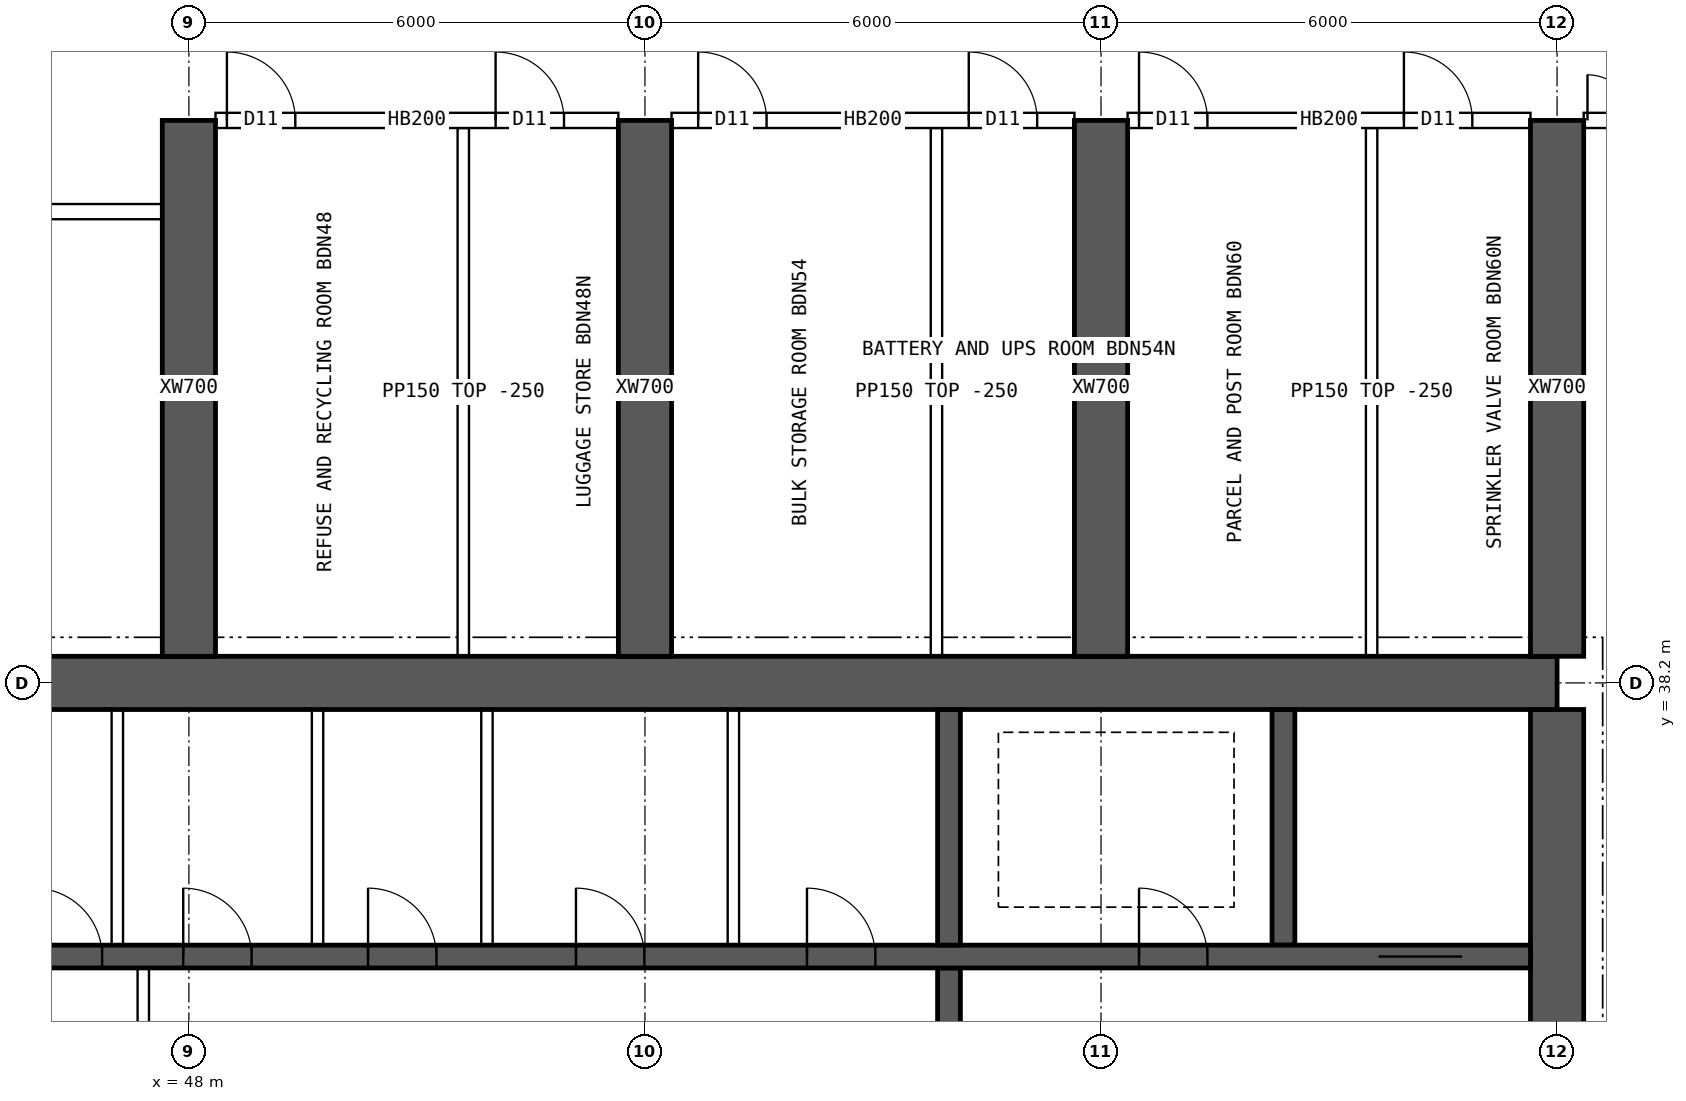
"""IFC4 building model, lengths in metres.
Left out: names, types, materials, properties, quantities, classifications, styles, units other than length and angle.
Written with IfcOpenShell. Run it as: python <this file> out.ifc"""

import sys

from ifc_helpers import new_model, si_unit, direction, frame, frame_2d, origin, place, context, subcontext, project, spatial, rectangle, extrude, element, fill, save


model = new_model("IFC4")
c1 = context("Model", 3, precision=1e-05, world=origin(), true_north=direction((0.0, 1.0)))
c2 = subcontext(c1, "Body", "Model", "MODEL_VIEW")
j1 = project(units=[si_unit("LENGTHUNIT", "METRE"), si_unit("PLANEANGLEUNIT", "RADIAN")], contexts=[c1])
p1 = place(None, origin())
s1 = spatial("IfcSite", under=j1, at=p1, CompositionType="ELEMENT")
p2 = place(p1, origin())
s2 = spatial("IfcBuilding", under=s1, at=p2, CompositionType="ELEMENT")
p3 = place(p2, frame((0.0, 0.0, 220.3)))
s3 = spatial("IfcBuildingStorey", under=s2, at=p3, CompositionType="ELEMENT", Elevation=220.3)
p4 = place(p3, frame((18.0, 38.2, 0.0), z_axis=(0.0, 0.0, 1.0), x_axis=(1.0, 0.0, 0.0)))
e1 = element("IfcWall", 1, at=p4, inside=s3, PredefinedType="SHEAR", context=c2, shape_type="SweptSolid", body=[
    extrude(rectangle(XDim=48.0, YDim=0.7, at=frame_2d((24.0, 0.0))), origin(), (0.0, 0.0, 1.0), 3.75),
])
p5 = place(p3, frame((66.0, 26.15, 0.0), z_axis=(0.0, 0.0, 1.0), x_axis=(0.0, 1.0, 0.0)))
e2 = element("IfcWall", 2, at=p5, inside=s3, PredefinedType="SHEAR", context=c2, shape_type="SweptSolid", body=[
    extrude(rectangle(XDim=11.7, YDim=0.7, at=frame_2d((5.85, 0.0))), origin(), (0.0, 0.0, 1.0), 3.75),
])
p6 = place(p5, frame((5.15, 0.0, 0.0)))
e3 = element("IfcOpeningElement", 3, at=p6, cuts=e2, PredefinedType="OPENING", context=c2, shape_type="SweptSolid", body=[
    extrude(rectangle(XDim=1.2, YDim=2.1, at=frame_2d((0.6, 1.05))), frame((0.0, 0.36, 0.0), z_axis=(0.0, -1.0, 0.0), x_axis=(1.0, 0.0, 0.0)), (0.0, 0.0, 1.0), 0.72),
])
p7 = place(p3, frame((18.35, 34.6, 0.0), z_axis=(0.0, 0.0, 1.0), x_axis=(1.0, 0.0, 0.0)))
e4 = element("IfcWall", 4, at=p7, inside=s3, PredefinedType="SHEAR", context=c2, shape_type="SweptSolid", body=[
    extrude(rectangle(XDim=47.3, YDim=0.3, at=frame_2d((23.65, 0.0))), origin(), (0.0, 0.0, 1.0), 3.75),
])
p8 = place(p7, frame((0.9, 0.0, 0.0)))
e5 = element("IfcOpeningElement", 5, at=p8, cuts=e4, PredefinedType="OPENING", context=c2, shape_type="SweptSolid", body=[
    extrude(rectangle(XDim=1.1, YDim=2.1, at=frame_2d((0.55, 1.05))), frame((0.0, 0.16, 0.0), z_axis=(0.0, -1.0, 0.0), x_axis=(1.0, 0.0, 0.0)), (0.0, 0.0, 1.0), 0.32),
])
p9 = place(p7, frame((45.3, 0.0, 0.0)))
e6 = element("IfcOpeningElement", 6, at=p9, cuts=e4, PredefinedType="OPENING", context=c2, shape_type="SweptSolid", body=[
    extrude(rectangle(XDim=1.1, YDim=2.1, at=frame_2d((0.55, 1.05))), frame((0.0, 0.16, 0.0), z_axis=(0.0, -1.0, 0.0), x_axis=(1.0, 0.0, 0.0)), (0.0, 0.0, 1.0), 0.32),
])
p10 = place(p7, frame((4.25, 0.0, 0.0)))
e7 = element("IfcOpeningElement", 7, at=p10, cuts=e4, PredefinedType="OPENING", context=c2, shape_type="SweptSolid", body=[
    extrude(rectangle(XDim=0.9, YDim=2.1, at=frame_2d((0.45, 1.05))), frame((0.0, 0.16, 0.0), z_axis=(0.0, -1.0, 0.0), x_axis=(1.0, 0.0, 0.0)), (0.0, 0.0, 1.0), 0.32),
])
p11 = place(p7, frame((42.15, 0.0, 0.0)))
e8 = element("IfcOpeningElement", 8, at=p11, cuts=e4, PredefinedType="OPENING", context=c2, shape_type="SweptSolid", body=[
    extrude(rectangle(XDim=0.9, YDim=2.1, at=frame_2d((0.45, 1.05))), frame((0.0, 0.16, 0.0), z_axis=(0.0, -1.0, 0.0), x_axis=(1.0, 0.0, 0.0)), (0.0, 0.0, 1.0), 0.32),
])
p12 = place(p7, frame((9.025, 0.0, 0.0)))
e9 = element("IfcOpeningElement", 9, at=p12, cuts=e4, PredefinedType="OPENING", context=c2, shape_type="SweptSolid", body=[
    extrude(rectangle(XDim=0.9, YDim=2.1, at=frame_2d((0.45, 1.05))), frame((0.0, 0.16, 0.0), z_axis=(0.0, -1.0, 0.0), x_axis=(1.0, 0.0, 0.0)), (0.0, 0.0, 1.0), 0.32),
])
p13 = place(p7, frame((12.999, 0.0, 0.0)))
e10 = element("IfcOpeningElement", 10, at=p13, cuts=e4, PredefinedType="OPENING", context=c2, shape_type="SweptSolid", body=[
    extrude(rectangle(XDim=0.9, YDim=2.1, at=frame_2d((0.45, 1.05))), frame((0.0, 0.16, 0.0), z_axis=(0.0, -1.0, 0.0), x_axis=(1.0, 0.0, 0.0)), (0.0, 0.0, 1.0), 0.32),
])
p14 = place(p7, frame((16.646, 0.0, 0.0)))
e11 = element("IfcOpeningElement", 11, at=p14, cuts=e4, PredefinedType="OPENING", context=c2, shape_type="SweptSolid", body=[
    extrude(rectangle(XDim=0.9, YDim=2.1, at=frame_2d((0.45, 1.05))), frame((0.0, 0.16, 0.0), z_axis=(0.0, -1.0, 0.0), x_axis=(1.0, 0.0, 0.0)), (0.0, 0.0, 1.0), 0.32),
])
p15 = place(p7, frame((20.405, 0.0, 0.0)))
e12 = element("IfcOpeningElement", 12, at=p15, cuts=e4, PredefinedType="OPENING", context=c2, shape_type="SweptSolid", body=[
    extrude(rectangle(XDim=0.9, YDim=2.1, at=frame_2d((0.45, 1.05))), frame((0.0, 0.16, 0.0), z_axis=(0.0, -1.0, 0.0), x_axis=(1.0, 0.0, 0.0)), (0.0, 0.0, 1.0), 0.32),
])
p16 = place(p7, frame((24.811, 0.0, 0.0)))
e13 = element("IfcOpeningElement", 13, at=p16, cuts=e4, PredefinedType="OPENING", context=c2, shape_type="SweptSolid", body=[
    extrude(rectangle(XDim=0.9, YDim=2.1, at=frame_2d((0.45, 1.05))), frame((0.0, 0.16, 0.0), z_axis=(0.0, -1.0, 0.0), x_axis=(1.0, 0.0, 0.0)), (0.0, 0.0, 1.0), 0.32),
])
p17 = place(p7, frame((27.608, 0.0, 0.0)))
e14 = element("IfcOpeningElement", 14, at=p17, cuts=e4, PredefinedType="OPENING", context=c2, shape_type="SweptSolid", body=[
    extrude(rectangle(XDim=0.9, YDim=2.1, at=frame_2d((0.45, 1.05))), frame((0.0, 0.16, 0.0), z_axis=(0.0, -1.0, 0.0), x_axis=(1.0, 0.0, 0.0)), (0.0, 0.0, 1.0), 0.32),
])
p18 = place(p7, frame((29.575, 0.0, 0.0)))
e15 = element("IfcOpeningElement", 15, at=p18, cuts=e4, PredefinedType="OPENING", context=c2, shape_type="SweptSolid", body=[
    extrude(rectangle(XDim=0.9, YDim=2.1, at=frame_2d((0.45, 1.05))), frame((0.0, 0.16, 0.0), z_axis=(0.0, -1.0, 0.0), x_axis=(1.0, 0.0, 0.0)), (0.0, 0.0, 1.0), 0.32),
])
p19 = place(p7, frame((32.007, 0.0, 0.0)))
e16 = element("IfcOpeningElement", 16, at=p19, cuts=e4, PredefinedType="OPENING", context=c2, shape_type="SweptSolid", body=[
    extrude(rectangle(XDim=0.9, YDim=2.1, at=frame_2d((0.45, 1.05))), frame((0.0, 0.16, 0.0), z_axis=(0.0, -1.0, 0.0), x_axis=(1.0, 0.0, 0.0)), (0.0, 0.0, 1.0), 0.32),
])
p20 = place(p7, frame((34.742, 0.0, 0.0)))
e17 = element("IfcOpeningElement", 17, at=p20, cuts=e4, PredefinedType="OPENING", context=c2, shape_type="SweptSolid", body=[
    extrude(rectangle(XDim=0.9, YDim=2.1, at=frame_2d((0.45, 1.05))), frame((0.0, 0.16, 0.0), z_axis=(0.0, -1.0, 0.0), x_axis=(1.0, 0.0, 0.0)), (0.0, 0.0, 1.0), 0.32),
])
p21 = place(p7, frame((37.781, 0.0, 0.0)))
e18 = element("IfcOpeningElement", 18, at=p21, cuts=e4, PredefinedType="OPENING", context=c2, shape_type="SweptSolid", body=[
    extrude(rectangle(XDim=0.9, YDim=2.1, at=frame_2d((0.45, 1.05))), frame((0.0, 0.16, 0.0), z_axis=(0.0, -1.0, 0.0), x_axis=(1.0, 0.0, 0.0)), (0.0, 0.0, 1.0), 0.32),
])
p22 = place(p3, frame((58.0, 30.55, 0.0), z_axis=(0.0, 0.0, 1.0), x_axis=(0.0, 1.0, 0.0)))
e19 = element("IfcWall", 19, at=p22, inside=s3, PredefinedType="SHEAR", context=c2, shape_type="SweptSolid", body=[
    extrude(rectangle(XDim=3.9, YDim=0.3, at=frame_2d((1.95, 0.0))), origin(), (0.0, 0.0, 1.0), 3.75),
])
p23 = place(p22, frame((1.4, 0.0, 0.0)))
e20 = element("IfcOpeningElement", 20, at=p23, cuts=e19, PredefinedType="OPENING", context=c2, shape_type="SweptSolid", body=[
    extrude(rectangle(XDim=1.2, YDim=2.1, at=frame_2d((0.6, 1.05))), frame((0.0, 0.16, 0.0), z_axis=(0.0, -1.0, 0.0), x_axis=(1.0, 0.0, 0.0)), (0.0, 0.0, 1.0), 0.32),
])
for number, where, z_axis, x_axis in (
    (21, (62.4, 34.75, 0.0), (0.0, 0.0, 1.0), (0.0, 1.0, 0.0)),
    (22, (58.0, 34.75, 0.0), (0.0, 0.0, 1.0), (0.0, 1.0, 0.0)),
):
    element("IfcWall", number, at=place(p3, frame(where, z_axis=z_axis, x_axis=x_axis)), inside=s3, PredefinedType="SHEAR", context=c2, shape_type="SweptSolid", body=[
        extrude(rectangle(XDim=3.1, YDim=0.3, at=frame_2d((1.55, 0.0))), origin(), (0.0, 0.0, 1.0), 3.75),
    ])
for number, where, z_axis, x_axis in (
    (23, (48.0, 38.55, 0.0), (0.0, 0.0, 1.0), (0.0, 1.0, 0.0)),
    (24, (54.0, 38.55, 0.0), (0.0, 0.0, 1.0), (0.0, 1.0, 0.0)),
    (25, (60.0, 38.55, 0.0), (0.0, 0.0, 1.0), (0.0, 1.0, 0.0)),
    (26, (66.0, 38.55, 0.0), (0.0, 0.0, 1.0), (0.0, 1.0, 0.0)),
):
    element("IfcWall", number, at=place(p3, frame(where, z_axis=z_axis, x_axis=x_axis)), inside=s3, PredefinedType="SHEAR", context=c2, shape_type="SweptSolid", body=[
        extrude(rectangle(XDim=7.05, YDim=0.7, at=frame_2d((3.525, 0.0))), origin(), (0.0, 0.0, 1.0), 3.75),
    ])
p24 = place(p3, frame((47.4, 30.55, 0.0), z_axis=(0.0, 0.0, 1.0), x_axis=(0.0, 1.0, 0.0)))
e27 = element("IfcWall", 27, at=p24, inside=s3, PredefinedType="SOLIDWALL", context=c2, shape_type="SweptSolid", body=[
    extrude(rectangle(XDim=3.9, YDim=0.15, at=frame_2d((1.95, 0.0))), origin(), (0.0, 0.0, 1.0), 3.5),
])
p25 = place(p24, frame((1.15, 0.0, 0.0)))
e28 = element("IfcOpeningElement", 28, at=p25, cuts=e27, PredefinedType="OPENING", context=c2, shape_type="SweptSolid", body=[
    extrude(rectangle(XDim=1.6, YDim=2.1, at=frame_2d((0.8, 1.05))), frame((0.0, 0.085, 0.0), z_axis=(0.0, -1.0, 0.0), x_axis=(1.0, 0.0, 0.0)), (0.0, 0.0, 1.0), 0.17),
])
for number, where, z_axis, x_axis in (
    (29, (47.058, 34.75, 0.0), (0.0, 0.0, 1.0), (0.0, 1.0, 0.0)),
    (30, (49.692, 34.75, 0.0), (0.0, 0.0, 1.0), (0.0, 1.0, 0.0)),
    (31, (51.921, 34.75, 0.0), (0.0, 0.0, 1.0), (0.0, 1.0, 0.0)),
    (32, (55.163, 34.75, 0.0), (0.0, 0.0, 1.0), (0.0, 1.0, 0.0)),
):
    element("IfcWall", number, at=place(p3, frame(where, z_axis=z_axis, x_axis=x_axis)), inside=s3, PredefinedType="SOLIDWALL", context=c2, shape_type="SweptSolid", body=[
        extrude(rectangle(XDim=3.1, YDim=0.15, at=frame_2d((1.55, 0.0))), origin(), (0.0, 0.0, 1.0), 3.5),
    ])
p26 = place(p3, frame((48.35, 45.6, 0.0), z_axis=(0.0, 0.0, 1.0), x_axis=(1.0, 0.0, 0.0)))
e33 = element("IfcWall", 33, at=p26, inside=s3, PredefinedType="SOLIDWALL", context=c2, shape_type="SweptSolid", body=[
    extrude(rectangle(XDim=5.3, YDim=0.2, at=frame_2d((2.65, 0.0))), origin(), (0.0, 0.0, 1.0), 3.5),
])
p27 = place(p26, frame((0.15, 0.0, 0.0)))
e34 = element("IfcOpeningElement", 34, at=p27, cuts=e33, PredefinedType="OPENING", context=c2, shape_type="SweptSolid", body=[
    extrude(rectangle(XDim=0.9, YDim=2.1, at=frame_2d((0.45, 1.05))), frame((0.0, 0.11, 0.0), z_axis=(0.0, -1.0, 0.0), x_axis=(1.0, 0.0, 0.0)), (0.0, 0.0, 1.0), 0.22),
])
p28 = place(p26, frame((3.685, 0.0, 0.0)))
e35 = element("IfcOpeningElement", 35, at=p28, cuts=e33, PredefinedType="OPENING", context=c2, shape_type="SweptSolid", body=[
    extrude(rectangle(XDim=0.9, YDim=2.1, at=frame_2d((0.45, 1.05))), frame((0.0, 0.11, 0.0), z_axis=(0.0, -1.0, 0.0), x_axis=(1.0, 0.0, 0.0)), (0.0, 0.0, 1.0), 0.22),
])
p29 = place(p3, frame((54.35, 45.6, 0.0), z_axis=(0.0, 0.0, 1.0), x_axis=(1.0, 0.0, 0.0)))
e36 = element("IfcWall", 36, at=p29, inside=s3, PredefinedType="SOLIDWALL", context=c2, shape_type="SweptSolid", body=[
    extrude(rectangle(XDim=5.3, YDim=0.2, at=frame_2d((2.65, 0.0))), origin(), (0.0, 0.0, 1.0), 3.5),
])
p30 = place(p29, frame((0.35, 0.0, 0.0)))
e37 = element("IfcOpeningElement", 37, at=p30, cuts=e36, PredefinedType="OPENING", context=c2, shape_type="SweptSolid", body=[
    extrude(rectangle(XDim=0.9, YDim=2.1, at=frame_2d((0.45, 1.05))), frame((0.0, 0.11, 0.0), z_axis=(0.0, -1.0, 0.0), x_axis=(1.0, 0.0, 0.0)), (0.0, 0.0, 1.0), 0.22),
])
p31 = place(p29, frame((3.91, 0.0, 0.0)))
e38 = element("IfcOpeningElement", 38, at=p31, cuts=e36, PredefinedType="OPENING", context=c2, shape_type="SweptSolid", body=[
    extrude(rectangle(XDim=0.9, YDim=2.1, at=frame_2d((0.45, 1.05))), frame((0.0, 0.11, 0.0), z_axis=(0.0, -1.0, 0.0), x_axis=(1.0, 0.0, 0.0)), (0.0, 0.0, 1.0), 0.22),
])
p32 = place(p3, frame((60.35, 45.6, 0.0), z_axis=(0.0, 0.0, 1.0), x_axis=(1.0, 0.0, 0.0)))
e39 = element("IfcWall", 39, at=p32, inside=s3, PredefinedType="SOLIDWALL", context=c2, shape_type="SweptSolid", body=[
    extrude(rectangle(XDim=5.3, YDim=0.2, at=frame_2d((2.65, 0.0))), origin(), (0.0, 0.0, 1.0), 3.5),
])
p33 = place(p32, frame((0.15, 0.0, 0.0)))
e40 = element("IfcOpeningElement", 40, at=p33, cuts=e39, PredefinedType="OPENING", context=c2, shape_type="SweptSolid", body=[
    extrude(rectangle(XDim=0.9, YDim=2.1, at=frame_2d((0.45, 1.05))), frame((0.0, 0.11, 0.0), z_axis=(0.0, -1.0, 0.0), x_axis=(1.0, 0.0, 0.0)), (0.0, 0.0, 1.0), 0.22),
])
p34 = place(p32, frame((3.635, 0.0, 0.0)))
e41 = element("IfcOpeningElement", 41, at=p34, cuts=e39, PredefinedType="OPENING", context=c2, shape_type="SweptSolid", body=[
    extrude(rectangle(XDim=0.9, YDim=2.1, at=frame_2d((0.45, 1.05))), frame((0.0, 0.11, 0.0), z_axis=(0.0, -1.0, 0.0), x_axis=(1.0, 0.0, 0.0)), (0.0, 0.0, 1.0), 0.22),
])
p35 = place(p3, frame((66.35, 45.6, 0.0), z_axis=(0.0, 0.0, 1.0), x_axis=(1.0, 0.0, 0.0)))
e42 = element("IfcWall", 42, at=p35, inside=s3, PredefinedType="SOLIDWALL", context=c2, shape_type="SweptSolid", body=[
    extrude(rectangle(XDim=2.05, YDim=0.2, at=frame_2d((1.025, 0.0))), origin(), (0.0, 0.0, 1.0), 3.5),
])
p36 = place(p35, frame((0.05, 0.0, 0.0)))
e43 = element("IfcOpeningElement", 43, at=p36, cuts=e42, PredefinedType="OPENING", context=c2, shape_type="SweptSolid", body=[
    extrude(rectangle(XDim=1.2, YDim=2.1, at=frame_2d((0.6, 1.05))), frame((0.0, 0.11, 0.0), z_axis=(0.0, -1.0, 0.0), x_axis=(1.0, 0.0, 0.0)), (0.0, 0.0, 1.0), 0.22),
])
p37 = place(p3, frame((42.35, 44.4, 0.0), z_axis=(0.0, 0.0, 1.0), x_axis=(1.0, 0.0, 0.0)))
e44 = element("IfcWall", 44, at=p37, inside=s3, PredefinedType="SOLIDWALL", context=c2, shape_type="SweptSolid", body=[
    extrude(rectangle(XDim=5.3, YDim=0.2, at=frame_2d((2.65, 0.0))), origin(), (0.0, 0.0, 1.0), 3.5),
])
p38 = place(p37, frame((0.8, 0.0, 0.0)))
e45 = element("IfcOpeningElement", 45, at=p38, cuts=e44, PredefinedType="OPENING", context=c2, shape_type="SweptSolid", body=[
    extrude(rectangle(XDim=1.0, YDim=2.1, at=frame_2d((0.5, 1.05))), frame((0.0, 0.11, 0.0), z_axis=(0.0, -1.0, 0.0), x_axis=(1.0, 0.0, 0.0)), (0.0, 0.0, 1.0), 0.22),
])
for number, where, z_axis, x_axis in (
    (46, (51.61, 38.55, 0.0), (0.0, 0.0, 1.0), (0.0, 1.0, 0.0)),
    (47, (57.835, 38.55, 0.0), (0.0, 0.0, 1.0), (0.0, 1.0, 0.0)),
    (48, (63.56, 38.55, 0.0), (0.0, 0.0, 1.0), (0.0, 1.0, 0.0)),
):
    element("IfcWall", number, at=place(p3, frame(where, z_axis=z_axis, x_axis=x_axis)), inside=s3, PredefinedType="PARTITIONING", context=c2, shape_type="SweptSolid", body=[
        extrude(rectangle(XDim=6.95, YDim=0.15, at=frame_2d((3.475, 0.0))), origin(), (0.0, 0.0, 1.0), 3.5),
    ])
p39 = place(p9, origin())
e49 = element("IfcDoor", 49, at=p39, inside=s3, OperationType="DOUBLE_DOOR_SLIDING", PredefinedType="DOOR", context=c2, shape_type="SweptSolid", body=[
    extrude(rectangle(XDim=1.1, YDim=2.1, at=frame_2d((0.55, 1.05))), frame((0.0, 0.025, 0.0), z_axis=(0.0, -1.0, 0.0), x_axis=(1.0, 0.0, 0.0)), (0.0, 0.0, 1.0), 0.05),
])
fill(e6, e49)
p40 = place(p11, origin())
e50 = element("IfcDoor", 50, at=p40, inside=s3, OperationType="SINGLE_SWING_LEFT", PredefinedType="DOOR", context=c2, shape_type="SweptSolid", body=[
    extrude(rectangle(XDim=0.9, YDim=2.1, at=frame_2d((0.45, 1.05))), frame((0.0, 0.025, 0.0), z_axis=(0.0, -1.0, 0.0), x_axis=(1.0, 0.0, 0.0)), (0.0, 0.0, 1.0), 0.05),
])
fill(e8, e50)
p41 = place(p17, origin())
e51 = element("IfcDoor", 51, at=p41, inside=s3, OperationType="SINGLE_SWING_LEFT", PredefinedType="DOOR", context=c2, shape_type="SweptSolid", body=[
    extrude(rectangle(XDim=0.9, YDim=2.1, at=frame_2d((0.45, 1.05))), frame((0.0, 0.025, 0.0), z_axis=(0.0, -1.0, 0.0), x_axis=(1.0, 0.0, 0.0)), (0.0, 0.0, 1.0), 0.05),
])
fill(e14, e51)
p42 = place(p18, origin())
e52 = element("IfcDoor", 52, at=p42, inside=s3, OperationType="SINGLE_SWING_LEFT", PredefinedType="DOOR", context=c2, shape_type="SweptSolid", body=[
    extrude(rectangle(XDim=0.9, YDim=2.1, at=frame_2d((0.45, 1.05))), frame((0.0, 0.025, 0.0), z_axis=(0.0, -1.0, 0.0), x_axis=(1.0, 0.0, 0.0)), (0.0, 0.0, 1.0), 0.05),
])
fill(e15, e52)
p43 = place(p19, origin())
e53 = element("IfcDoor", 53, at=p43, inside=s3, OperationType="SINGLE_SWING_LEFT", PredefinedType="DOOR", context=c2, shape_type="SweptSolid", body=[
    extrude(rectangle(XDim=0.9, YDim=2.1, at=frame_2d((0.45, 1.05))), frame((0.0, 0.025, 0.0), z_axis=(0.0, -1.0, 0.0), x_axis=(1.0, 0.0, 0.0)), (0.0, 0.0, 1.0), 0.05),
])
fill(e16, e53)
p44 = place(p20, origin())
e54 = element("IfcDoor", 54, at=p44, inside=s3, OperationType="SINGLE_SWING_LEFT", PredefinedType="DOOR", context=c2, shape_type="SweptSolid", body=[
    extrude(rectangle(XDim=0.9, YDim=2.1, at=frame_2d((0.45, 1.05))), frame((0.0, 0.025, 0.0), z_axis=(0.0, -1.0, 0.0), x_axis=(1.0, 0.0, 0.0)), (0.0, 0.0, 1.0), 0.05),
])
fill(e17, e54)
p45 = place(p21, origin())
e55 = element("IfcDoor", 55, at=p45, inside=s3, OperationType="SINGLE_SWING_LEFT", PredefinedType="DOOR", context=c2, shape_type="SweptSolid", body=[
    extrude(rectangle(XDim=0.9, YDim=2.1, at=frame_2d((0.45, 1.05))), frame((0.0, 0.025, 0.0), z_axis=(0.0, -1.0, 0.0), x_axis=(1.0, 0.0, 0.0)), (0.0, 0.0, 1.0), 0.05),
])
fill(e18, e55)
p46 = place(p36, origin())
e56 = element("IfcDoor", 56, at=p46, inside=s3, OperationType="DOUBLE_DOOR_SINGLE_SWING", PredefinedType="DOOR", context=c2, shape_type="SweptSolid", body=[
    extrude(rectangle(XDim=1.2, YDim=2.1, at=frame_2d((0.6, 1.05))), frame((0.0, 0.025, 0.0), z_axis=(0.0, -1.0, 0.0), x_axis=(1.0, 0.0, 0.0)), (0.0, 0.0, 1.0), 0.05),
])
fill(e43, e56)
p47 = place(p27, origin())
e57 = element("IfcDoor", 57, at=p47, inside=s3, OperationType="SINGLE_SWING_LEFT", PredefinedType="DOOR", context=c2, shape_type="SweptSolid", body=[
    extrude(rectangle(XDim=0.9, YDim=2.1, at=frame_2d((0.45, 1.05))), frame((0.0, 0.025, 0.0), z_axis=(0.0, -1.0, 0.0), x_axis=(1.0, 0.0, 0.0)), (0.0, 0.0, 1.0), 0.05),
])
fill(e34, e57)
p48 = place(p28, origin())
e58 = element("IfcDoor", 58, at=p48, inside=s3, OperationType="SINGLE_SWING_LEFT", PredefinedType="DOOR", context=c2, shape_type="SweptSolid", body=[
    extrude(rectangle(XDim=0.9, YDim=2.1, at=frame_2d((0.45, 1.05))), frame((0.0, 0.025, 0.0), z_axis=(0.0, -1.0, 0.0), x_axis=(1.0, 0.0, 0.0)), (0.0, 0.0, 1.0), 0.05),
])
fill(e35, e58)
p49 = place(p30, origin())
e59 = element("IfcDoor", 59, at=p49, inside=s3, OperationType="SINGLE_SWING_LEFT", PredefinedType="DOOR", context=c2, shape_type="SweptSolid", body=[
    extrude(rectangle(XDim=0.9, YDim=2.1, at=frame_2d((0.45, 1.05))), frame((0.0, 0.025, 0.0), z_axis=(0.0, -1.0, 0.0), x_axis=(1.0, 0.0, 0.0)), (0.0, 0.0, 1.0), 0.05),
])
fill(e37, e59)
p50 = place(p31, origin())
e60 = element("IfcDoor", 60, at=p50, inside=s3, OperationType="SINGLE_SWING_LEFT", PredefinedType="DOOR", context=c2, shape_type="SweptSolid", body=[
    extrude(rectangle(XDim=0.9, YDim=2.1, at=frame_2d((0.45, 1.05))), frame((0.0, 0.025, 0.0), z_axis=(0.0, -1.0, 0.0), x_axis=(1.0, 0.0, 0.0)), (0.0, 0.0, 1.0), 0.05),
])
fill(e38, e60)
p51 = place(p33, origin())
e61 = element("IfcDoor", 61, at=p51, inside=s3, OperationType="SINGLE_SWING_LEFT", PredefinedType="DOOR", context=c2, shape_type="SweptSolid", body=[
    extrude(rectangle(XDim=0.9, YDim=2.1, at=frame_2d((0.45, 1.05))), frame((0.0, 0.025, 0.0), z_axis=(0.0, -1.0, 0.0), x_axis=(1.0, 0.0, 0.0)), (0.0, 0.0, 1.0), 0.05),
])
fill(e40, e61)
p52 = place(p34, origin())
e62 = element("IfcDoor", 62, at=p52, inside=s3, OperationType="SINGLE_SWING_LEFT", PredefinedType="DOOR", context=c2, shape_type="SweptSolid", body=[
    extrude(rectangle(XDim=0.9, YDim=2.1, at=frame_2d((0.45, 1.05))), frame((0.0, 0.025, 0.0), z_axis=(0.0, -1.0, 0.0), x_axis=(1.0, 0.0, 0.0)), (0.0, 0.0, 1.0), 0.05),
])
fill(e41, e62)
save(model, sys.argv[1])
